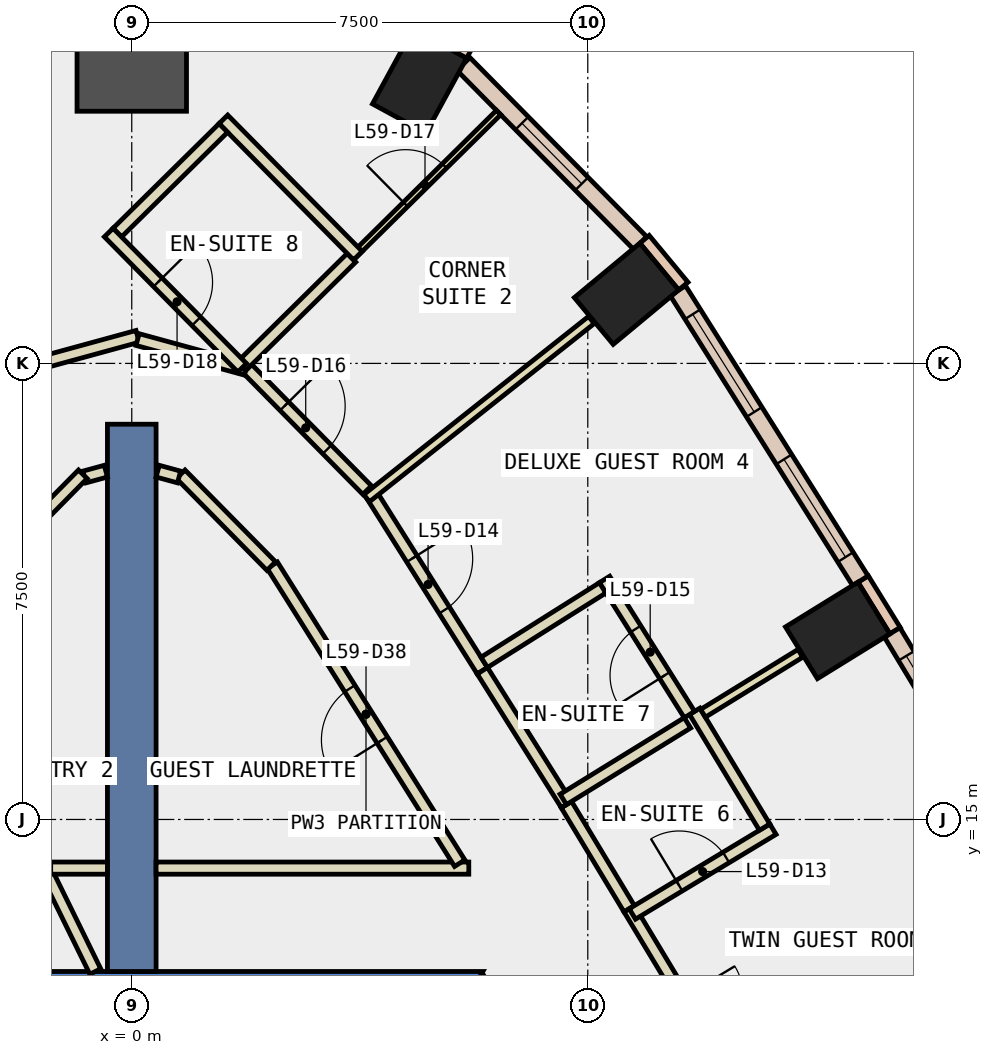
"""IFC4 building model, lengths in metres.
Left out: names, types, materials, properties, quantities, classifications, styles, units other than length and angle.
Written with IfcOpenShell. Run it as: python <this file> out.ifc"""

import sys

from ifc_helpers import new_model, si_unit, direction, frame, frame_2d, origin, origin_2d, place, context, subcontext, project, spatial, polyline, rectangle, outline, extrude, element, fill, save


model = new_model("IFC4")
c1 = context("Model", 3, precision=1e-05, world=origin(), true_north=direction((0.0, 1.0)))
c2 = subcontext(c1, "Body", "Model", "MODEL_VIEW")
j1 = project(units=[si_unit("LENGTHUNIT", "METRE"), si_unit("PLANEANGLEUNIT", "RADIAN")], contexts=[c1])
p1 = place(None, origin())
s1 = spatial("IfcSite", under=j1, at=p1, CompositionType="ELEMENT")
p2 = place(p1, origin())
s2 = spatial("IfcBuilding", under=s1, at=p2, CompositionType="ELEMENT")
p3 = place(p2, frame((0.0, 0.0, 259.4)))
s3 = spatial("IfcBuildingStorey", under=s2, at=p3, CompositionType="ELEMENT", Elevation=259.4)
for number, where, z_axis, x_axis in (
    (1, (11.61, 18.109, -0.34), (0.0, 0.0, 1.0), (-0.526, 0.851, 0.0)),
    (2, (8.137, 23.645, -0.34), (0.0, 0.0, 1.0), (-0.639, 0.769, 0.0)),
    (3, (4.733, 27.143, -0.34), (0.0, 0.0, 1.0), (-0.878, 0.478, 0.0)),
):
    element("IfcColumn", number, at=place(p3, frame(where, z_axis=z_axis, x_axis=x_axis)), inside=s3, PredefinedType="COLUMN", context=c2, shape_type="SweptSolid", body=[
        extrude(rectangle(XDim=1.0, YDim=1.4, at=origin_2d()), origin(), (0.0, 0.0, 1.0), 3.6),
    ])
p4 = place(p3, frame((0.0, 27.547, -0.34), z_axis=(0.0, 0.0, 1.0), x_axis=(0.0, 1.0, 0.0)))
e4 = element("IfcColumn", 4, at=p4, inside=s3, PredefinedType="COLUMN", context=c2, shape_type="SweptSolid", body=[
    extrude(rectangle(XDim=1.8, YDim=1.8, at=origin_2d()), origin(), (0.0, 0.0, 1.0), 3.6),
])
p5 = place(p3, frame((0.0, 0.0, -0.34)))
e5 = element("IfcWall", 5, at=p5, inside=s3, PredefinedType="SHEAR", context=c2, shape_type="SweptSolid", body=[
    extrude(outline(polyline([(5.774, 12.5), (-5.774, 12.5), (-5.427, 11.9), (5.427, 11.9), (5.774, 12.5)])), origin(), (0.0, 0.0, 1.0), 3.6),
])
p6 = place(p3, frame((0.0, 12.5, -0.34), z_axis=(0.0, 0.0, 1.0), x_axis=(0.0, 1.0, 0.0)))
e6 = element("IfcWall", 6, at=p6, inside=s3, PredefinedType="SHEAR", context=c2, shape_type="SweptSolid", body=[
    extrude(rectangle(XDim=9.0, YDim=0.8, at=frame_2d((4.5, 0.0))), origin(), (0.0, 0.0, 1.0), 3.6),
])
p7 = place(p3, frame((5.555, 27.606, 0.0), z_axis=(0.0, 0.0, 1.0), x_axis=(-0.878250009632, 0.478201757191, 0.0)))
e7 = element("IfcWall", 7, at=p7, inside=s3, PredefinedType="STANDARD", context=c2, shape_type="SweptSolid", body=[
    extrude(rectangle(XDim=1.0, YDim=0.2, at=frame_2d((0.5, 0.0))), origin(), (0.0, 0.0, 1.0), 3.26),
])
p8 = place(p3, frame((12.554, 18.104, 0.0), z_axis=(0.0, 0.0, 1.0), x_axis=(-0.525648735675, 0.850701714282, 0.0)))
e8 = element("IfcWall", 8, at=p8, inside=s3, PredefinedType="STANDARD", context=c2, shape_type="SweptSolid", body=[
    extrude(rectangle(XDim=1.0, YDim=0.2, at=frame_2d((0.5, 0.0))), origin(), (0.0, 0.0, 1.0), 3.26),
])
p9 = place(p3, frame((9.071, 23.771, 0.0), z_axis=(0.0, 0.0, 1.0), x_axis=(-0.637972365578, 0.770059257953, 0.0)))
e9 = element("IfcWall", 9, at=p9, inside=s3, PredefinedType="STANDARD", context=c2, shape_type="SweptSolid", body=[
    extrude(rectangle(XDim=1.0, YDim=0.2, at=frame_2d((0.5, 0.0))), origin(), (0.0, 0.0, 1.0), 3.26),
])
p10 = place(p3, frame((15.399, 13.277, 0.0), z_axis=(0.0, 0.0, 1.0), x_axis=(-0.516269519619, 0.856426169096, 0.0)))
e10 = element("IfcWall", 10, at=p10, inside=s3, PredefinedType="STANDARD", context=c2, shape_type="SweptSolid", body=[
    extrude(rectangle(XDim=5.603, YDim=0.3, at=frame_2d((2.802, 0.0))), origin(), (0.0, 0.0, 1.0), 3.26),
])
p11 = place(p10, frame((0.451, 0.0, 0.9)))
e11 = element("IfcOpeningElement", 11, at=p11, cuts=e10, PredefinedType="OPENING", context=c2, shape_type="SweptSolid", body=[
    extrude(rectangle(XDim=1.9, YDim=2.0, at=frame_2d((0.95, 1.0))), frame((0.0, 0.16, 0.0), z_axis=(0.0, -1.0, 0.0), x_axis=(1.0, 0.0, 0.0)), (0.0, 0.0, 1.0), 0.32),
])
p12 = place(p10, frame((3.253, 0.0, 0.9)))
e12 = element("IfcOpeningElement", 12, at=p12, cuts=e10, PredefinedType="OPENING", context=c2, shape_type="SweptSolid", body=[
    extrude(rectangle(XDim=1.9, YDim=2.0, at=frame_2d((0.95, 1.0))), frame((0.0, 0.16, 0.0), z_axis=(0.0, -1.0, 0.0), x_axis=(1.0, 0.0, 0.0)), (0.0, 0.0, 1.0), 0.32),
])
p13 = place(p3, frame((11.983, 18.926, 0.0), z_axis=(0.0, 0.0, 1.0), x_axis=(-0.532558226688, 0.846393369059, 0.0)))
e13 = element("IfcWall", 13, at=p13, inside=s3, PredefinedType="STANDARD", context=c2, shape_type="SweptSolid", body=[
    extrude(rectangle(XDim=5.637, YDim=0.3, at=frame_2d((2.818, 0.0))), origin(), (0.0, 0.0, 1.0), 3.26),
])
p14 = place(p13, frame((0.459, 0.0, 0.9)))
e14 = element("IfcOpeningElement", 14, at=p14, cuts=e13, PredefinedType="OPENING", context=c2, shape_type="SweptSolid", body=[
    extrude(rectangle(XDim=1.9, YDim=2.0, at=frame_2d((0.95, 1.0))), frame((0.0, 0.16, 0.0), z_axis=(0.0, -1.0, 0.0), x_axis=(1.0, 0.0, 0.0)), (0.0, 0.0, 1.0), 0.32),
])
p15 = place(p13, frame((3.278, 0.0, 0.9)))
e15 = element("IfcOpeningElement", 15, at=p15, cuts=e13, PredefinedType="OPENING", context=c2, shape_type="SweptSolid", body=[
    extrude(rectangle(XDim=1.9, YDim=2.0, at=frame_2d((0.95, 1.0))), frame((0.0, 0.16, 0.0), z_axis=(0.0, -1.0, 0.0), x_axis=(1.0, 0.0, 0.0)), (0.0, 0.0, 1.0), 0.32),
])
p16 = place(p3, frame((8.361, 24.48, 0.0), z_axis=(0.0, 0.0, 1.0), x_axis=(-0.702488411246, 0.711695181989, 0.0)))
e16 = element("IfcWall", 16, at=p16, inside=s3, PredefinedType="STANDARD", context=c2, shape_type="SweptSolid", body=[
    extrude(rectangle(XDim=4.137, YDim=0.3, at=frame_2d((2.068, 0.0))), origin(), (0.0, 0.0, 1.0), 3.26),
])
p17 = place(p16, frame((1.368, 0.0, 0.9)))
e17 = element("IfcOpeningElement", 17, at=p17, cuts=e16, PredefinedType="OPENING", context=c2, shape_type="SweptSolid", body=[
    extrude(rectangle(XDim=1.4, YDim=2.0, at=frame_2d((0.7, 1.0))), frame((0.0, 0.16, 0.0), z_axis=(0.0, -1.0, 0.0), x_axis=(1.0, 0.0, 0.0)), (0.0, 0.0, 1.0), 0.32),
])
p18 = place(p3, frame((-0.6, 12.5, 0.0), z_axis=(0.0, 0.0, 1.0), x_axis=(-0.440531456598, 0.897737175206, 0.0)))
e18 = element("IfcWall", 18, at=p18, inside=s3, PredefinedType="PARTITIONING", context=c2, shape_type="SweptSolid", body=[
    extrude(rectangle(XDim=1.918, YDim=0.2, at=frame_2d((0.959, 0.0))), origin(), (0.0, 0.0, 1.0), 3.26),
])
p19 = place(p3, frame((0.4, 14.2, 0.0), z_axis=(0.0, 0.0, 1.0), x_axis=(1.0, 0.0, 0.0)))
e19 = element("IfcWall", 19, at=p19, inside=s3, PredefinedType="PARTITIONING", context=c2, shape_type="SweptSolid", body=[
    extrude(rectangle(XDim=5.143, YDim=0.2, at=frame_2d((2.572, 0.0))), origin(), (0.0, 0.0, 1.0), 3.26),
])
p20 = place(p3, frame((5.394, 14.281, 0.0), z_axis=(0.0, 0.0, 1.0), x_axis=(-0.532551510955, 0.846397594621, 0.0)))
e20 = element("IfcWall", 20, at=p20, inside=s3, PredefinedType="PARTITIONING", context=c2, shape_type="SweptSolid", body=[
    extrude(rectangle(XDim=5.789, YDim=0.2, at=frame_2d((2.895, 0.0))), origin(), (0.0, 0.0, 1.0), 3.26),
])
p21 = place(p20, frame((2.394, 0.0, 0.0)))
e21 = element("IfcOpeningElement", 21, at=p21, cuts=e20, PredefinedType="OPENING", context=c2, shape_type="SweptSolid", body=[
    extrude(rectangle(XDim=1.0, YDim=2.1, at=frame_2d((0.5, 1.05))), frame((0.0, 0.11, 0.0), z_axis=(0.0, -1.0, 0.0), x_axis=(1.0, 0.0, 0.0)), (0.0, 0.0, 1.0), 0.22),
])
p22 = place(p3, frame((2.294, 19.167, 0.0), z_axis=(0.0, 0.0, 1.0), x_axis=(-0.70213913596, 0.712039769784, 0.0)))
e22 = element("IfcWall", 22, at=p22, inside=s3, PredefinedType="PARTITIONING", context=c2, shape_type="SweptSolid", body=[
    extrude(rectangle(XDim=2.121, YDim=0.2, at=frame_2d((1.06, 0.0))), origin(), (0.0, 0.0, 1.0), 3.26),
])
p23 = place(p3, frame((0.778, 20.632, 0.0), z_axis=(0.0, 0.0, 1.0), x_axis=(-0.964810127056, 0.262947558899, 0.0)))
e23 = element("IfcWall", 23, at=p23, inside=s3, PredefinedType="PARTITIONING", context=c2, shape_type="SweptSolid", body=[
    extrude(rectangle(XDim=0.365, YDim=0.2, at=frame_2d((0.183, 0.0))), origin(), (0.0, 0.0, 1.0), 3.26),
])
p24 = place(p3, frame((-1.334, 14.2, 0.0), z_axis=(0.0, 0.0, 1.0), x_axis=(1.0, 0.0, 0.0)))
e24 = element("IfcWall", 24, at=p24, inside=s3, PredefinedType="PARTITIONING", context=c2, shape_type="SweptSolid", body=[
    extrude(rectangle(XDim=0.934, YDim=0.2, at=frame_2d((0.467, 0.0))), origin(), (0.0, 0.0, 1.0), 3.26),
])
p25 = place(p3, frame((-0.426, 20.728, 0.0), z_axis=(0.0, 0.0, 1.0), x_axis=(-0.964810127056, -0.262947558899, 0.0)))
e25 = element("IfcWall", 25, at=p25, inside=s3, PredefinedType="PARTITIONING", context=c2, shape_type="SweptSolid", body=[
    extrude(rectangle(XDim=0.365, YDim=0.2, at=frame_2d((0.183, 0.0))), origin(), (0.0, 0.0, 1.0), 3.26),
])
p26 = place(p3, frame((-0.805, 20.677, 0.0), z_axis=(0.0, 0.0, 1.0), x_axis=(-0.70213913596, -0.712039769784, 0.0)))
e26 = element("IfcWall", 26, at=p26, inside=s3, PredefinedType="PARTITIONING", context=c2, shape_type="SweptSolid", body=[
    extrude(rectangle(XDim=2.121, YDim=0.2, at=frame_2d((1.06, 0.0))), origin(), (0.0, 0.0, 1.0), 3.26),
])
p27 = place(p3, frame((8.181, 13.532, 0.0), z_axis=(0.0, 0.0, 1.0), x_axis=(0.51625987265, -0.856431984393, 0.0)))
e27 = element("IfcWall", 27, at=p27, inside=s3, PredefinedType="PARTITIONING", context=c2, shape_type="SweptSolid", body=[
    extrude(rectangle(XDim=4.312, YDim=0.2, at=frame_2d((2.156, 0.0))), origin(), (0.0, 0.0, 1.0), 3.26),
])
p28 = place(p27, frame((1.706, 0.0, 0.0)))
e28 = element("IfcOpeningElement", 28, at=p28, cuts=e27, PredefinedType="OPENING", context=c2, shape_type="SweptSolid", body=[
    extrude(rectangle(XDim=1.0, YDim=2.1, at=frame_2d((0.5, 1.05))), frame((0.0, 0.11, 0.0), z_axis=(0.0, -1.0, 0.0), x_axis=(1.0, 0.0, 0.0)), (0.0, 0.0, 1.0), 0.22),
])
p29 = place(p3, frame((7.148, 15.245, 0.0), z_axis=(0.0, 0.0, 1.0), x_axis=(0.516361066184, -0.856370976463, 0.0)))
e29 = element("IfcWall", 29, at=p29, inside=s3, PredefinedType="PARTITIONING", context=c2, shape_type="SweptSolid", body=[
    extrude(rectangle(XDim=2.0, YDim=0.2, at=frame_2d((1.0, 0.0))), origin(), (0.0, 0.0, 1.0), 3.26),
])
p30 = place(p3, frame((3.928, 20.367, 0.0), z_axis=(0.0, 0.0, 1.0), x_axis=(0.532616247911, -0.846356858814, 0.0)))
e30 = element("IfcWall", 30, at=p30, inside=s3, PredefinedType="PARTITIONING", context=c2, shape_type="SweptSolid", body=[
    extrude(rectangle(XDim=3.451, YDim=0.2, at=frame_2d((1.726, 0.0))), origin(), (0.0, 0.0, 1.0), 3.26),
])
p31 = place(p30, frame((1.275, 0.0, 0.0)))
e31 = element("IfcOpeningElement", 31, at=p31, cuts=e30, PredefinedType="OPENING", context=c2, shape_type="SweptSolid", body=[
    extrude(rectangle(XDim=1.0, YDim=2.1, at=frame_2d((0.5, 1.05))), frame((0.0, 0.11, 0.0), z_axis=(0.0, -1.0, 0.0), x_axis=(1.0, 0.0, 0.0)), (0.0, 0.0, 1.0), 0.22),
])
p32 = place(p3, frame((5.766, 17.446, 0.0), z_axis=(0.0, 0.0, 1.0), x_axis=(0.532437006176, -0.846469629966, 0.0)))
e32 = element("IfcWall", 32, at=p32, inside=s3, PredefinedType="PARTITIONING", context=c2, shape_type="SweptSolid", body=[
    extrude(rectangle(XDim=2.599, YDim=0.2, at=frame_2d((1.299, 0.0))), origin(), (0.0, 0.0, 1.0), 3.26),
])
p33 = place(p3, frame((1.851, 22.464, 0.0), z_axis=(0.0, 0.0, 1.0), x_axis=(0.70237969133, -0.711802479068, 0.0)))
e33 = element("IfcWall", 33, at=p33, inside=s3, PredefinedType="PARTITIONING", context=c2, shape_type="SweptSolid", body=[
    extrude(rectangle(XDim=2.876, YDim=0.2, at=frame_2d((1.438, 0.0))), origin(), (0.0, 0.0, 1.0), 3.26),
])
p34 = place(p33, frame((0.938, 0.0, 0.0)))
e34 = element("IfcOpeningElement", 34, at=p34, cuts=e33, PredefinedType="OPENING", context=c2, shape_type="SweptSolid", body=[
    extrude(rectangle(XDim=1.0, YDim=2.1, at=frame_2d((0.5, 1.05))), frame((0.0, 0.11, 0.0), z_axis=(0.0, -1.0, 0.0), x_axis=(1.0, 0.0, 0.0)), (0.0, 0.0, 1.0), 0.22),
])
p35 = place(p3, frame((-1.825, 22.419, 0.0), z_axis=(0.0, 0.0, 1.0), x_axis=(0.964477541401, 0.26416485787, 0.0)))
e35 = element("IfcWall", 35, at=p35, inside=s3, PredefinedType="PARTITIONING", context=c2, shape_type="SweptSolid", body=[
    extrude(rectangle(XDim=1.992, YDim=0.2, at=frame_2d((0.996, 0.0))), origin(), (0.0, 0.0, 1.0), 3.26),
])
p36 = place(p3, frame((0.096, 22.892, 0.0), z_axis=(0.0, 0.0, 1.0), x_axis=(0.964519582336, -0.264011316595, 0.0)))
e36 = element("IfcWall", 36, at=p36, inside=s3, PredefinedType="PARTITIONING", context=c2, shape_type="SweptSolid", body=[
    extrude(rectangle(XDim=1.849, YDim=0.2, at=frame_2d((0.924, 0.0))), origin(), (0.0, 0.0, 1.0), 3.26),
])
p37 = place(p3, frame((8.233, 13.446, 0.0), z_axis=(0.0, 0.0, 1.0), x_axis=(0.856373825811, 0.516356340589, 0.0)))
e37 = element("IfcWall", 37, at=p37, inside=s3, PredefinedType="PARTITIONING", context=c2, shape_type="SweptSolid", body=[
    extrude(rectangle(XDim=2.7, YDim=0.2, at=frame_2d((1.35, 0.0))), origin(), (0.0, 0.0, 1.0), 3.26),
])
p38 = place(p37, frame((0.9, 0.0, 0.0)))
e38 = element("IfcOpeningElement", 38, at=p38, cuts=e37, PredefinedType="OPENING", context=c2, shape_type="SweptSolid", body=[
    extrude(rectangle(XDim=0.9, YDim=2.1, at=frame_2d((0.45, 1.05))), frame((0.0, 0.11, 0.0), z_axis=(0.0, -1.0, 0.0), x_axis=(1.0, 0.0, 0.0)), (0.0, 0.0, 1.0), 0.22),
])
p39 = place(p3, frame((10.408, 14.874, 0.0), z_axis=(0.0, 0.0, 1.0), x_axis=(-0.516768967276, 0.856124894195, 0.0)))
e39 = element("IfcWall", 39, at=p39, inside=s3, PredefinedType="PARTITIONING", context=c2, shape_type="SweptSolid", body=[
    extrude(rectangle(XDim=2.225, YDim=0.2, at=frame_2d((1.113, 0.0))), origin(), (0.0, 0.0, 1.0), 3.26),
])
p40 = place(p3, frame((9.395, 16.746, 0.0), z_axis=(0.0, 0.0, 1.0), x_axis=(0.851524542888, 0.524314745987, 0.0)))
e40 = element("IfcWall", 40, at=p40, inside=s3, PredefinedType="PARTITIONING", context=c2, shape_type="SweptSolid", body=[
    extrude(rectangle(XDim=1.88, YDim=0.15, at=frame_2d((0.94, 0.0))), origin(), (0.0, 0.0, 1.0), 3.26),
])
p41 = place(p3, frame((7.097, 15.33, 0.0), z_axis=(0.0, 0.0, 1.0), x_axis=(0.851207242031, 0.524829716302, 0.0)))
e41 = element("IfcWall", 41, at=p41, inside=s3, PredefinedType="PARTITIONING", context=c2, shape_type="SweptSolid", body=[
    extrude(rectangle(XDim=2.399, YDim=0.2, at=frame_2d((1.199, 0.0))), origin(), (0.0, 0.0, 1.0), 3.26),
])
p42 = place(p3, frame((9.172, 16.725, 0.0), z_axis=(0.0, 0.0, 1.0), x_axis=(-0.532329646536, 0.846537150643, 0.0)))
e42 = element("IfcWall", 42, at=p42, inside=s3, PredefinedType="PARTITIONING", context=c2, shape_type="SweptSolid", body=[
    extrude(rectangle(XDim=2.625, YDim=0.2, at=frame_2d((1.312, 0.0))), origin(), (0.0, 0.0, 1.0), 3.26),
])
p43 = place(p42, frame((0.763, 0.0, 0.0)))
e43 = element("IfcOpeningElement", 43, at=p43, cuts=e42, PredefinedType="OPENING", context=c2, shape_type="SweptSolid", body=[
    extrude(rectangle(XDim=0.9, YDim=2.1, at=frame_2d((0.45, 1.05))), frame((0.0, 0.11, 0.0), z_axis=(0.0, -1.0, 0.0), x_axis=(1.0, 0.0, 0.0)), (0.0, 0.0, 1.0), 0.22),
])
p44 = place(p3, frame((7.744, 18.809, 0.0), z_axis=(0.0, 0.0, 1.0), x_axis=(-0.846360434059, -0.532610566605, 0.0)))
e44 = element("IfcWall", 44, at=p44, inside=s3, PredefinedType="PARTITIONING", context=c2, shape_type="SweptSolid", body=[
    extrude(rectangle(XDim=2.3, YDim=0.2, at=frame_2d((1.15, 0.0))), origin(), (0.0, 0.0, 1.0), 3.26),
])
p45 = place(p3, frame((3.863, 20.284, 0.0), z_axis=(0.0, 0.0, 1.0), x_axis=(0.783618453885, 0.621242399335, 0.0)))
e45 = element("IfcWall", 45, at=p45, inside=s3, PredefinedType="PARTITIONING", context=c2, shape_type="SweptSolid", body=[
    extrude(rectangle(XDim=4.717, YDim=0.15, at=frame_2d((2.358, 0.0))), origin(), (0.0, 0.0, 1.0), 3.26),
])
p46 = place(p3, frame((3.613, 24.237, 0.0), z_axis=(0.0, 0.0, 1.0), x_axis=(0.711651188682, 0.702532978335, 0.0)))
e46 = element("IfcWall", 46, at=p46, inside=s3, PredefinedType="PARTITIONING", context=c2, shape_type="SweptSolid", body=[
    extrude(rectangle(XDim=3.4, YDim=0.1, at=frame_2d((1.7, 0.0))), origin(), (0.0, 0.0, 1.0), 3.26),
])
p47 = place(p46, frame((1.25, 0.0, 0.0)))
e47 = element("IfcOpeningElement", 47, at=p47, cuts=e46, PredefinedType="OPENING", context=c2, shape_type="SweptSolid", body=[
    extrude(rectangle(XDim=0.9, YDim=2.1, at=frame_2d((0.45, 1.05))), frame((0.0, 0.06, 0.0), z_axis=(0.0, -1.0, 0.0), x_axis=(1.0, 0.0, 0.0)), (0.0, 0.0, 1.0), 0.12),
])
p48 = place(p3, frame((1.798, 22.446, 0.0), z_axis=(0.0, 0.0, 1.0), x_axis=(0.711782817297, 0.702399616316, 0.0)))
e48 = element("IfcWall", 48, at=p48, inside=s3, PredefinedType="PARTITIONING", context=c2, shape_type="SweptSolid", body=[
    extrude(rectangle(XDim=2.55, YDim=0.2, at=frame_2d((1.275, 0.0))), origin(), (0.0, 0.0, 1.0), 3.26),
])
p49 = place(p3, frame((3.719, 24.272, 0.0), z_axis=(0.0, 0.0, 1.0), x_axis=(-0.70232328337, 0.711858135893, 0.0)))
e49 = element("IfcWall", 49, at=p49, inside=s3, PredefinedType="PARTITIONING", context=c2, shape_type="SweptSolid", body=[
    extrude(rectangle(XDim=3.149, YDim=0.2, at=frame_2d((1.575, 0.0))), origin(), (0.0, 0.0, 1.0), 3.26),
])
p50 = place(p3, frame((1.506, 26.372, 0.0), z_axis=(0.0, 0.0, 1.0), x_axis=(-0.711773999329, -0.702408551969, 0.0)))
e50 = element("IfcWall", 50, at=p50, inside=s3, PredefinedType="PARTITIONING", context=c2, shape_type="SweptSolid", body=[
    extrude(rectangle(XDim=2.45, YDim=0.2, at=frame_2d((1.225, 0.0))), origin(), (0.0, 0.0, 1.0), 3.26),
])
p51 = place(p3, frame((-0.379, 24.652, 0.0), z_axis=(0.0, 0.0, 1.0), x_axis=(0.702559610983, -0.711624896286, 0.0)))
e51 = element("IfcWall", 51, at=p51, inside=s3, PredefinedType="PARTITIONING", context=c2, shape_type="SweptSolid", body=[
    extrude(rectangle(XDim=3.124, YDim=0.2, at=frame_2d((1.562, 0.0))), origin(), (0.0, 0.0, 1.0), 3.26),
])
p52 = place(p51, frame((1.15, 0.0, 0.0)))
e52 = element("IfcOpeningElement", 52, at=p52, cuts=e51, PredefinedType="OPENING", context=c2, shape_type="SweptSolid", body=[
    extrude(rectangle(XDim=0.9, YDim=2.1, at=frame_2d((0.45, 1.05))), frame((0.0, 0.11, 0.0), z_axis=(0.0, -1.0, 0.0), x_axis=(1.0, 0.0, 0.0)), (0.0, 0.0, 1.0), 0.22),
])
p53 = place(p12, origin())
e53 = element("IfcWindow", 53, at=p53, inside=s3, PartitioningType="SINGLE_PANEL", PredefinedType="WINDOW", context=c2, shape_type="SweptSolid", body=[
    extrude(rectangle(XDim=1.9, YDim=2.0, at=frame_2d((0.95, 1.0))), frame((0.0, 0.03, 0.0), z_axis=(0.0, -1.0, 0.0), x_axis=(1.0, 0.0, 0.0)), (0.0, 0.0, 1.0), 0.06),
])
fill(e12, e53)
p54 = place(p14, origin())
e54 = element("IfcWindow", 54, at=p54, inside=s3, PartitioningType="SINGLE_PANEL", PredefinedType="WINDOW", context=c2, shape_type="SweptSolid", body=[
    extrude(rectangle(XDim=1.9, YDim=2.0, at=frame_2d((0.95, 1.0))), frame((0.0, 0.03, 0.0), z_axis=(0.0, -1.0, 0.0), x_axis=(1.0, 0.0, 0.0)), (0.0, 0.0, 1.0), 0.06),
])
fill(e14, e54)
p55 = place(p15, origin())
e55 = element("IfcWindow", 55, at=p55, inside=s3, PartitioningType="SINGLE_PANEL", PredefinedType="WINDOW", context=c2, shape_type="SweptSolid", body=[
    extrude(rectangle(XDim=1.9, YDim=2.0, at=frame_2d((0.95, 1.0))), frame((0.0, 0.03, 0.0), z_axis=(0.0, -1.0, 0.0), x_axis=(1.0, 0.0, 0.0)), (0.0, 0.0, 1.0), 0.06),
])
fill(e15, e55)
p56 = place(p17, origin())
e56 = element("IfcWindow", 56, at=p56, inside=s3, PartitioningType="SINGLE_PANEL", PredefinedType="WINDOW", context=c2, shape_type="SweptSolid", body=[
    extrude(rectangle(XDim=1.4, YDim=2.0, at=frame_2d((0.7, 1.0))), frame((0.0, 0.03, 0.0), z_axis=(0.0, -1.0, 0.0), x_axis=(1.0, 0.0, 0.0)), (0.0, 0.0, 1.0), 0.06),
])
fill(e17, e56)
p57 = place(p38, origin())
e57 = element("IfcDoor", 57, at=p57, inside=s3, OperationType="SINGLE_SWING_LEFT", PredefinedType="DOOR", context=c2, shape_type="SweptSolid", body=[
    extrude(rectangle(XDim=0.9, YDim=2.1, at=frame_2d((0.45, 1.05))), frame((0.0, 0.025, 0.0), z_axis=(0.0, -1.0, 0.0), x_axis=(1.0, 0.0, 0.0)), (0.0, 0.0, 1.0), 0.05),
])
fill(e38, e57)
p58 = place(p31, origin())
e58 = element("IfcDoor", 58, at=p58, inside=s3, OperationType="SINGLE_SWING_LEFT", PredefinedType="DOOR", context=c2, shape_type="SweptSolid", body=[
    extrude(rectangle(XDim=1.0, YDim=2.1, at=frame_2d((0.5, 1.05))), frame((0.0, 0.025, 0.0), z_axis=(0.0, -1.0, 0.0), x_axis=(1.0, 0.0, 0.0)), (0.0, 0.0, 1.0), 0.05),
])
fill(e31, e58)
p59 = place(p43, origin())
e59 = element("IfcDoor", 59, at=p59, inside=s3, OperationType="SINGLE_SWING_LEFT", PredefinedType="DOOR", context=c2, shape_type="SweptSolid", body=[
    extrude(rectangle(XDim=0.9, YDim=2.1, at=frame_2d((0.45, 1.05))), frame((0.0, 0.025, 0.0), z_axis=(0.0, -1.0, 0.0), x_axis=(1.0, 0.0, 0.0)), (0.0, 0.0, 1.0), 0.05),
])
fill(e43, e59)
p60 = place(p34, origin())
e60 = element("IfcDoor", 60, at=p60, inside=s3, OperationType="SINGLE_SWING_LEFT", PredefinedType="DOOR", context=c2, shape_type="SweptSolid", body=[
    extrude(rectangle(XDim=1.0, YDim=2.1, at=frame_2d((0.5, 1.05))), frame((0.0, 0.025, 0.0), z_axis=(0.0, -1.0, 0.0), x_axis=(1.0, 0.0, 0.0)), (0.0, 0.0, 1.0), 0.05),
])
fill(e34, e60)
p61 = place(p47, origin())
e61 = element("IfcDoor", 61, at=p61, inside=s3, OperationType="SINGLE_SWING_RIGHT", PredefinedType="DOOR", context=c2, shape_type="SweptSolid", body=[
    extrude(rectangle(XDim=0.9, YDim=2.1, at=frame_2d((0.45, 1.05))), frame((0.0, 0.025, 0.0), z_axis=(0.0, -1.0, 0.0), x_axis=(1.0, 0.0, 0.0)), (0.0, 0.0, 1.0), 0.05),
])
fill(e47, e61)
p62 = place(p52, origin())
e62 = element("IfcDoor", 62, at=p62, inside=s3, OperationType="SINGLE_SWING_RIGHT", PredefinedType="DOOR", context=c2, shape_type="SweptSolid", body=[
    extrude(rectangle(XDim=0.9, YDim=2.1, at=frame_2d((0.45, 1.05))), frame((0.0, 0.025, 0.0), z_axis=(0.0, -1.0, 0.0), x_axis=(1.0, 0.0, 0.0)), (0.0, 0.0, 1.0), 0.05),
])
fill(e52, e62)
p63 = place(p21, origin())
e63 = element("IfcDoor", 63, at=p63, inside=s3, OperationType="SINGLE_SWING_LEFT", PredefinedType="DOOR", context=c2, shape_type="SweptSolid", body=[
    extrude(rectangle(XDim=1.0, YDim=2.1, at=frame_2d((0.5, 1.05))), frame((0.0, 0.025, 0.0), z_axis=(0.0, -1.0, 0.0), x_axis=(1.0, 0.0, 0.0)), (0.0, 0.0, 1.0), 0.05),
])
fill(e21, e63)
save(model, sys.argv[1])
